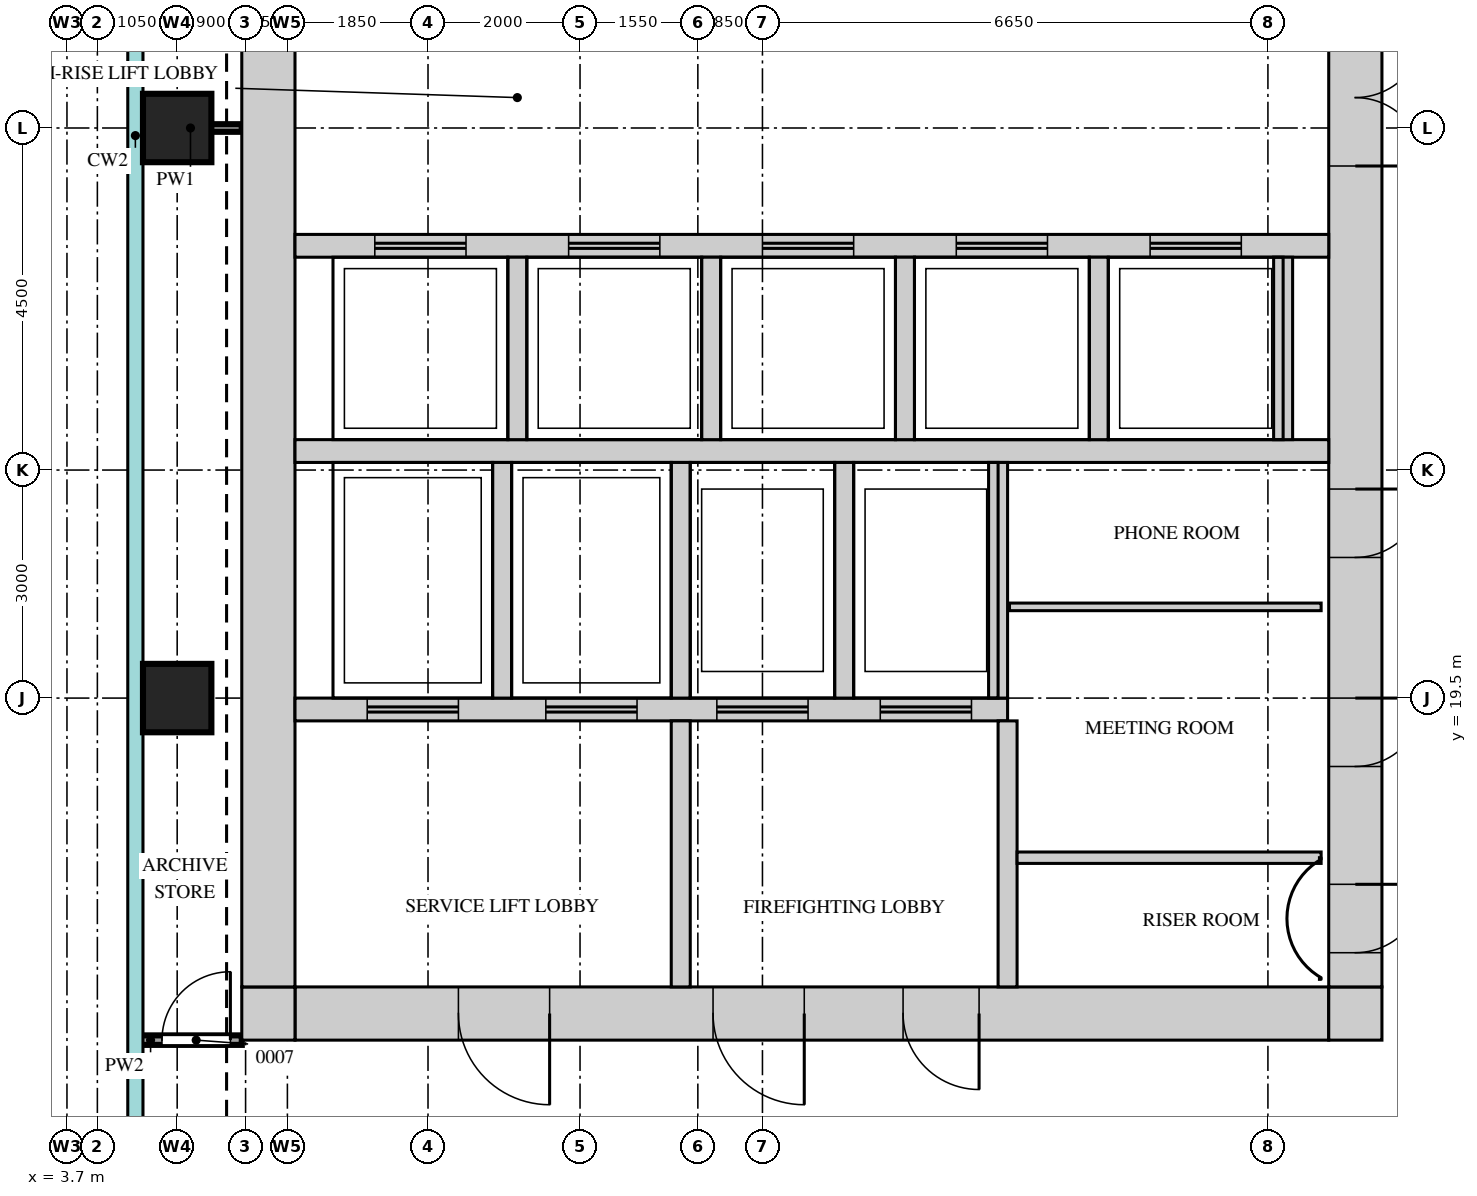
"""IFC4 building model, lengths in metres.
Left out: names, types, materials, properties, quantities, classifications, styles, units other than length and angle.
Written with IfcOpenShell. Run it as: python <this file> out.ifc"""

import sys

from ifc_helpers import new_model, si_unit, direction, frame, frame_2d, origin, origin_2d, place, context, subcontext, project, spatial, rectangle, extrude, source, transform, mapped, element, fill, save


model = new_model("IFC4")
c1 = context("Model", 3, precision=1e-05, world=origin(), true_north=direction((0.0, 1.0)))
c2 = subcontext(c1, "Body", "Model", "MODEL_VIEW")
j1 = project(units=[si_unit("LENGTHUNIT", "METRE"), si_unit("PLANEANGLEUNIT", "RADIAN")], contexts=[c1])
p1 = place(None, origin())
s1 = spatial("IfcSite", under=j1, at=p1, CompositionType="ELEMENT")
p2 = place(p1, origin())
s2 = spatial("IfcBuilding", under=s1, at=p2, CompositionType="ELEMENT")
p3 = place(p2, frame((0.0, 0.0, 230.2)))
s3 = spatial("IfcBuildingStorey", under=s2, at=p3, CompositionType="ELEMENT", Elevation=230.2)
m1 = source(origin(), c2, "Body", "SweptSolid", [
    extrude(rectangle(XDim=13.6, YDim=0.7, at=frame_2d((6.8, 0.0))), origin(), (0.0, 0.0, 1.0), 3.75),
])
p4 = place(p3, frame((6.7, 15.35, 0.0), z_axis=(0.0, 0.0, 1.0), x_axis=(1.0, 0.0, 0.0)))
e1 = element("IfcWall", 1, at=p4, inside=s3, PredefinedType="SHEAR", context=c2, shape_type="MappedRepresentation", body=[
    mapped(m1, transform((0.0, 0.0, 0.0))),
])
m2 = source(origin(), c2, "Body", "SweptSolid", [
    extrude(rectangle(XDim=1.2, YDim=2.1, at=frame_2d((0.6, 1.05))), frame((0.0, 0.36, 0.0), z_axis=(0.0, -1.0, 0.0), x_axis=(1.0, 0.0, 0.0)), (0.0, 0.0, 1.0), 0.72),
])
p5 = place(p4, frame((5.5, 0.0, 0.0)))
e2 = element("IfcOpeningElement", 2, at=p5, cuts=e1, PredefinedType="OPENING", context=c2, shape_type="MappedRepresentation", body=[
    mapped(m2, transform((0.0, 0.0, 0.0))),
])
p6 = place(p4, frame((2.15, 0.0, 0.0)))
e3 = element("IfcOpeningElement", 3, at=p6, cuts=e1, PredefinedType="OPENING", context=c2, shape_type="MappedRepresentation", body=[
    mapped(m2, transform((0.0, 0.0, 0.0))),
])
m3 = source(origin(), c2, "Body", "SweptSolid", [
    extrude(rectangle(XDim=1.0, YDim=2.1, at=frame_2d((0.5, 1.05))), frame((0.0, 0.36, 0.0), z_axis=(0.0, -1.0, 0.0), x_axis=(1.0, 0.0, 0.0)), (0.0, 0.0, 1.0), 0.72),
])
p7 = place(p4, frame((8.0, 0.0, 0.0)))
e4 = element("IfcOpeningElement", 4, at=p7, cuts=e1, PredefinedType="OPENING", context=c2, shape_type="MappedRepresentation", body=[
    mapped(m3, transform((0.0, 0.0, 0.0))),
])
m4 = source(origin(), c2, "Body", "SweptSolid", [
    extrude(rectangle(XDim=0.7, YDim=0.7, at=frame_2d((0.35, 0.0))), origin(), (0.0, 0.0, 1.0), 3.75),
])
for number, where, z_axis, x_axis in (
    (5, (20.3, 15.35, 0.0), (0.0, 0.0, 1.0), (1.0, 0.0, 0.0)),
    (6, (6.0, 15.35, 0.0), (0.0, 0.0, 1.0), (1.0, 0.0, 0.0)),
):
    element("IfcWall", number, at=place(p3, frame(where, z_axis=z_axis, x_axis=x_axis)), inside=s3, PredefinedType="SHEAR", context=c2, shape_type="MappedRepresentation", body=[
        mapped(m4, transform((0.0, 0.0, 0.0))),
    ])
m5 = source(origin(), c2, "Body", "SweptSolid", [
    extrude(rectangle(XDim=22.6, YDim=0.7, at=frame_2d((11.3, 0.0))), origin(), (0.0, 0.0, 1.0), 3.75),
])
p8 = place(p3, frame((20.65, 15.7, 0.0), z_axis=(0.0, 0.0, 1.0), x_axis=(0.0, 1.0, 0.0)))
e7 = element("IfcWall", 7, at=p8, inside=s3, PredefinedType="SHEAR", context=c2, shape_type="MappedRepresentation", body=[
    mapped(m5, transform((0.0, 0.0, 0.0))),
])
m6 = source(origin(), c2, "Body", "SweptSolid", [
    extrude(rectangle(XDim=1.8, YDim=2.1, at=frame_2d((0.9, 1.05))), frame((0.0, 0.36, 0.0), z_axis=(0.0, -1.0, 0.0), x_axis=(1.0, 0.0, 0.0)), (0.0, 0.0, 1.0), 0.72),
])
p9 = place(p8, frame((10.8, 0.0, 0.0)))
e8 = element("IfcOpeningElement", 8, at=p9, cuts=e7, PredefinedType="OPENING", context=c2, shape_type="MappedRepresentation", body=[
    mapped(m6, transform((0.0, 0.0, 0.0))),
])
m7 = source(origin(), c2, "Body", "SweptSolid", [
    extrude(rectangle(XDim=0.9, YDim=2.1, at=frame_2d((0.45, 1.05))), frame((0.0, 0.36, 0.0), z_axis=(0.0, -1.0, 0.0), x_axis=(1.0, 0.0, 0.0)), (0.0, 0.0, 1.0), 0.72),
])
p10 = place(p8, frame((0.45, 0.0, 0.0)))
e9 = element("IfcOpeningElement", 9, at=p10, cuts=e7, PredefinedType="OPENING", context=c2, shape_type="MappedRepresentation", body=[
    mapped(m7, transform((0.0, 0.0, 0.0))),
])
p11 = place(p8, frame((2.9, 0.0, 0.0)))
e10 = element("IfcOpeningElement", 10, at=p11, cuts=e7, PredefinedType="OPENING", context=c2, shape_type="MappedRepresentation", body=[
    mapped(m7, transform((0.0, 0.0, 0.0))),
])
p12 = place(p8, frame((5.65, 0.0, 0.0)))
e11 = element("IfcOpeningElement", 11, at=p12, cuts=e7, PredefinedType="OPENING", context=c2, shape_type="MappedRepresentation", body=[
    mapped(m7, transform((0.0, 0.0, 0.0))),
])
p13 = place(p3, frame((6.35, 15.7, 0.0), z_axis=(0.0, 0.0, 1.0), x_axis=(0.0, 1.0, 0.0)))
e12 = element("IfcWall", 12, at=p13, inside=s3, PredefinedType="SHEAR", context=c2, shape_type="MappedRepresentation", body=[
    mapped(m5, transform((0.0, 0.0, 0.0))),
])
m8 = source(origin(), c2, "Body", "SweptSolid", [
    extrude(rectangle(XDim=13.6, YDim=0.3, at=frame_2d((6.8, 0.0))), origin(), (0.0, 0.0, 1.0), 3.75),
])
p14 = place(p3, frame((6.7, 22.75, 0.0), z_axis=(0.0, 0.0, 1.0), x_axis=(1.0, 0.0, 0.0)))
e13 = element("IfcWall", 13, at=p14, inside=s3, PredefinedType="STANDARD", context=c2, shape_type="MappedRepresentation", body=[
    mapped(m8, transform((0.0, 0.0, 0.0))),
])
m9 = source(origin(), c2, "Body", "SweptSolid", [
    extrude(rectangle(XDim=9.375, YDim=0.3, at=frame_2d((4.688, 0.0))), origin(), (0.0, 0.0, 1.0), 3.75),
])
p15 = place(p3, frame((6.7, 19.35, 0.0), z_axis=(0.0, 0.0, 1.0), x_axis=(1.0, 0.0, 0.0)))
e14 = element("IfcWall", 14, at=p15, inside=s3, PredefinedType="STANDARD", context=c2, shape_type="MappedRepresentation", body=[
    mapped(m9, transform((0.0, 0.0, 0.0))),
])
m10 = source(origin(), c2, "Body", "SweptSolid", [
    extrude(rectangle(XDim=1.2, YDim=2.1, at=frame_2d((0.6, 1.05))), frame((0.0, 0.16, 0.0), z_axis=(0.0, -1.0, 0.0), x_axis=(1.0, 0.0, 0.0)), (0.0, 0.0, 1.0), 0.32),
])
p16 = place(p15, frame((0.95, 0.0, 0.0)))
e15 = element("IfcOpeningElement", 15, at=p16, cuts=e14, PredefinedType="OPENING", context=c2, shape_type="MappedRepresentation", body=[
    mapped(m10, transform((0.0, 0.0, 0.0))),
])
p17 = place(p15, frame((3.3, 0.0, 0.0)))
e16 = element("IfcOpeningElement", 16, at=p17, cuts=e14, PredefinedType="OPENING", context=c2, shape_type="MappedRepresentation", body=[
    mapped(m10, transform((0.0, 0.0, 0.0))),
])
p18 = place(p15, frame((5.55, 0.0, 0.0)))
e17 = element("IfcOpeningElement", 17, at=p18, cuts=e14, PredefinedType="OPENING", context=c2, shape_type="MappedRepresentation", body=[
    mapped(m10, transform((0.0, 0.0, 0.0))),
])
p19 = place(p15, frame((7.7, 0.0, 0.0)))
e18 = element("IfcOpeningElement", 18, at=p19, cuts=e14, PredefinedType="OPENING", context=c2, shape_type="MappedRepresentation", body=[
    mapped(m10, transform((0.0, 0.0, 0.0))),
])
p20 = place(p3, frame((6.7, 25.45, 0.0), z_axis=(0.0, 0.0, 1.0), x_axis=(1.0, 0.0, 0.0)))
e19 = element("IfcWall", 19, at=p20, inside=s3, PredefinedType="STANDARD", context=c2, shape_type="MappedRepresentation", body=[
    mapped(m8, transform((0.0, 0.0, 0.0))),
])
p21 = place(p20, frame((1.05, 0.0, 0.0)))
e20 = element("IfcOpeningElement", 20, at=p21, cuts=e19, PredefinedType="OPENING", context=c2, shape_type="MappedRepresentation", body=[
    mapped(m10, transform((0.0, 0.0, 0.0))),
])
p22 = place(p20, frame((3.6, 0.0, 0.0)))
e21 = element("IfcOpeningElement", 21, at=p22, cuts=e19, PredefinedType="OPENING", context=c2, shape_type="MappedRepresentation", body=[
    mapped(m10, transform((0.0, 0.0, 0.0))),
])
p23 = place(p20, frame((6.15, 0.0, 0.0)))
e22 = element("IfcOpeningElement", 22, at=p23, cuts=e19, PredefinedType="OPENING", context=c2, shape_type="MappedRepresentation", body=[
    mapped(m10, transform((0.0, 0.0, 0.0))),
])
p24 = place(p20, frame((8.7, 0.0, 0.0)))
e23 = element("IfcOpeningElement", 23, at=p24, cuts=e19, PredefinedType="OPENING", context=c2, shape_type="MappedRepresentation", body=[
    mapped(m10, transform((0.0, 0.0, 0.0))),
])
p25 = place(p20, frame((11.25, 0.0, 0.0)))
e24 = element("IfcOpeningElement", 24, at=p25, cuts=e19, PredefinedType="OPENING", context=c2, shape_type="MappedRepresentation", body=[
    mapped(m10, transform((0.0, 0.0, 0.0))),
])
m11 = source(origin(), c2, "Body", "SweptSolid", [
    extrude(rectangle(XDim=3.1, YDim=0.25, at=frame_2d((1.55, 0.0))), origin(), (0.0, 0.0, 1.0), 3.75),
])
for number, where, z_axis, x_axis in (
    (25, (9.425, 19.5, 0.0), (0.0, 0.0, 1.0), (0.0, 1.0, 0.0)),
    (26, (11.775, 19.5, 0.0), (0.0, 0.0, 1.0), (0.0, 1.0, 0.0)),
    (27, (13.925, 19.5, 0.0), (0.0, 0.0, 1.0), (0.0, 1.0, 0.0)),
    (28, (15.95, 19.5, 0.0), (0.0, 0.0, 1.0), (0.0, 1.0, 0.0)),
):
    element("IfcWall", number, at=place(p3, frame(where, z_axis=z_axis, x_axis=x_axis)), inside=s3, PredefinedType="STANDARD", context=c2, shape_type="MappedRepresentation", body=[
        mapped(m11, transform((0.0, 0.0, 0.0))),
    ])
m12 = source(origin(), c2, "Body", "SweptSolid", [
    extrude(rectangle(XDim=2.4, YDim=0.25, at=frame_2d((1.2, 0.0))), origin(), (0.0, 0.0, 1.0), 3.75),
])
for number, where, z_axis, x_axis in (
    (29, (17.275, 22.9, 0.0), (0.0, 0.0, 1.0), (0.0, 1.0, 0.0)),
    (30, (19.7, 22.9, 0.0), (0.0, 0.0, 1.0), (0.0, 1.0, 0.0)),
    (31, (9.625, 22.9, 0.0), (0.0, 0.0, 1.0), (0.0, 1.0, 0.0)),
    (32, (12.175, 22.9, 0.0), (0.0, 0.0, 1.0), (0.0, 1.0, 0.0)),
    (33, (14.725, 22.9, 0.0), (0.0, 0.0, 1.0), (0.0, 1.0, 0.0)),
):
    element("IfcWall", number, at=place(p3, frame(where, z_axis=z_axis, x_axis=x_axis)), inside=s3, PredefinedType="STANDARD", context=c2, shape_type="MappedRepresentation", body=[
        mapped(m12, transform((0.0, 0.0, 0.0))),
    ])
m13 = source(origin(), c2, "Body", "SweptSolid", [
    extrude(rectangle(XDim=3.5, YDim=0.25, at=frame_2d((1.75, 0.0))), origin(), (0.0, 0.0, 1.0), 3.75),
])
for number, where, z_axis, x_axis in (
    (34, (16.075, 15.7, 0.0), (0.0, 0.0, 1.0), (0.0, 1.0, 0.0)),
    (35, (11.775, 15.7, 0.0), (0.0, 0.0, 1.0), (0.0, 1.0, 0.0)),
):
    element("IfcWall", number, at=place(p3, frame(where, z_axis=z_axis, x_axis=x_axis)), inside=s3, PredefinedType="STANDARD", context=c2, shape_type="MappedRepresentation", body=[
        mapped(m13, transform((0.0, 0.0, 0.0))),
    ])
m14 = source(origin(), c2, "Body", "SweptSolid", [
    extrude(rectangle(XDim=0.9, YDim=0.9, at=origin_2d()), origin(), (0.0, 0.0, 1.0), 3.75),
])
for number, where, z_axis, x_axis in (
    (36, (5.15, 19.5, 0.0), (0.0, 0.0, 1.0), (1.0, 0.0, 0.0)),
    (37, (5.15, 27.0, 0.0), (0.0, 0.0, 1.0), (1.0, 0.0, 0.0)),
):
    element("IfcColumn", number, at=place(p3, frame(where, z_axis=z_axis, x_axis=x_axis)), inside=s3, PredefinedType="COLUMN", context=c2, shape_type="MappedRepresentation", body=[
        mapped(m14, transform((0.0, 0.0, 0.0))),
    ])
m15 = source(origin(), c2, "Body", "SweptSolid", [
    extrude(rectangle(XDim=1.35, YDim=0.125, at=frame_2d((0.675, 0.0))), origin(), (0.0, 0.0, 1.0), 3.8),
])
p26 = place(p3, frame((4.65, 15.0, 0.0), z_axis=(0.0, 0.0, 1.0), x_axis=(1.0, 0.0, 0.0)))
e38 = element("IfcWall", 38, at=p26, inside=s3, PredefinedType="PARTITIONING", context=c2, shape_type="MappedRepresentation", body=[
    mapped(m15, transform((0.0, 0.0, 0.0))),
])
m16 = source(origin(), c2, "Body", "SweptSolid", [
    extrude(rectangle(XDim=0.9, YDim=2.1, at=frame_2d((0.45, 1.05))), frame((0.0, 0.073, 0.0), z_axis=(0.0, -1.0, 0.0), x_axis=(1.0, 0.0, 0.0)), (0.0, 0.0, 1.0), 0.145),
])
p27 = place(p26, frame((0.3, 0.0, 0.0)))
e39 = element("IfcOpeningElement", 39, at=p27, cuts=e38, PredefinedType="OPENING", context=c2, shape_type="MappedRepresentation", body=[
    mapped(m16, transform((0.0, 0.0, 0.0))),
])
m17 = source(origin(), c2, "Body", "SweptSolid", [
    extrude(rectangle(XDim=4.0, YDim=0.15, at=frame_2d((2.0, 0.0))), origin(), (0.0, 0.0, 1.0), 3.8),
])
p28 = place(p3, frame((16.2, 17.4, 0.0), z_axis=(0.0, 0.0, 1.0), x_axis=(1.0, 0.0, 0.0)))
e40 = element("IfcWall", 40, at=p28, inside=s3, PredefinedType="PARTITIONING", context=c2, shape_type="MappedRepresentation", body=[
    mapped(m17, transform((0.0, 0.0, 0.0))),
])
m18 = source(origin(), c2, "Body", "SweptSolid", [
    extrude(rectangle(XDim=4.1, YDim=0.1, at=frame_2d((2.05, 0.0))), origin(), (0.0, 0.0, 1.0), 3.8),
])
p29 = place(p3, frame((16.1, 20.7, 0.0), z_axis=(0.0, 0.0, 1.0), x_axis=(1.0, 0.0, 0.0)))
e41 = element("IfcWall", 41, at=p29, inside=s3, PredefinedType="PARTITIONING", context=c2, shape_type="MappedRepresentation", body=[
    mapped(m18, transform((0.0, 0.0, 0.0))),
])
m19 = source(origin(), c2, "Body", "SweptSolid", [
    extrude(rectangle(XDim=1.35, YDim=0.1, at=frame_2d((0.675, 0.0))), origin(), (0.0, 0.0, 1.0), 3.8),
])
p30 = place(p3, frame((4.65, 27.0, 0.0), z_axis=(0.0, 0.0, 1.0), x_axis=(1.0, 0.0, 0.0)))
e42 = element("IfcWall", 42, at=p30, inside=s3, PredefinedType="PARTITIONING", context=c2, shape_type="MappedRepresentation", body=[
    mapped(m19, transform((0.0, 0.0, 0.0))),
])
m20 = source(origin(), c2, "Body", "SweptSolid", [
    extrude(rectangle(XDim=1.8, YDim=2.1, at=frame_2d((0.9, 1.05))), frame((0.0, 0.3, 0.0), z_axis=(0.0, -1.0, 0.0), x_axis=(1.0, 0.0, 0.0)), (0.0, 0.0, 1.0), 0.6),
])
p31 = place(p9, origin())
e43 = element("IfcDoor", 43, at=p31, inside=s3, OperationType="DOUBLE_DOOR_SINGLE_SWING", PredefinedType="DOOR", context=c2, shape_type="MappedRepresentation", body=[
    mapped(m20, transform((0.0, 0.0, 0.0))),
])
fill(e8, e43)
m21 = source(origin(), c2, "Body", "SweptSolid", [
    extrude(rectangle(XDim=0.9, YDim=2.1, at=frame_2d((0.45, 1.05))), frame((0.0, 0.3, 0.0), z_axis=(0.0, -1.0, 0.0), x_axis=(1.0, 0.0, 0.0)), (0.0, 0.0, 1.0), 0.6),
])
p32 = place(p10, origin())
e44 = element("IfcDoor", 44, at=p32, inside=s3, OperationType="SINGLE_SWING_RIGHT", PredefinedType="DOOR", context=c2, shape_type="MappedRepresentation", body=[
    mapped(m21, transform((0.0, 0.0, 0.0))),
])
fill(e9, e44)
p33 = place(p11, origin())
e45 = element("IfcDoor", 45, at=p33, inside=s3, OperationType="SINGLE_SWING_RIGHT", PredefinedType="DOOR", context=c2, shape_type="MappedRepresentation", body=[
    mapped(m21, transform((0.0, 0.0, 0.0))),
])
fill(e10, e45)
p34 = place(p12, origin())
e46 = element("IfcDoor", 46, at=p34, inside=s3, OperationType="SINGLE_SWING_RIGHT", PredefinedType="DOOR", context=c2, shape_type="MappedRepresentation", body=[
    mapped(m21, transform((0.0, 0.0, 0.0))),
])
fill(e11, e46)
m22 = source(origin(), c2, "Body", "SweptSolid", [
    extrude(rectangle(XDim=1.2, YDim=2.1, at=frame_2d((0.6, 1.05))), frame((0.0, 0.3, 0.0), z_axis=(0.0, -1.0, 0.0), x_axis=(1.0, 0.0, 0.0)), (0.0, 0.0, 1.0), 0.6),
])
p35 = place(p5, origin())
e47 = element("IfcDoor", 47, at=p35, inside=s3, OperationType="SINGLE_SWING_RIGHT", PredefinedType="DOOR", context=c2, shape_type="MappedRepresentation", body=[
    mapped(m22, transform((0.0, 0.0, 0.0))),
])
fill(e2, e47)
p36 = place(p6, origin())
e48 = element("IfcDoor", 48, at=p36, inside=s3, OperationType="SINGLE_SWING_RIGHT", PredefinedType="DOOR", context=c2, shape_type="MappedRepresentation", body=[
    mapped(m22, transform((0.0, 0.0, 0.0))),
])
fill(e3, e48)
m23 = source(origin(), c2, "Body", "SweptSolid", [
    extrude(rectangle(XDim=1.0, YDim=2.1, at=frame_2d((0.5, 1.05))), frame((0.0, 0.3, 0.0), z_axis=(0.0, -1.0, 0.0), x_axis=(1.0, 0.0, 0.0)), (0.0, 0.0, 1.0), 0.6),
])
p37 = place(p7, origin())
e49 = element("IfcDoor", 49, at=p37, inside=s3, OperationType="SINGLE_SWING_RIGHT", PredefinedType="DOOR", context=c2, shape_type="MappedRepresentation", body=[
    mapped(m23, transform((0.0, 0.0, 0.0))),
])
fill(e4, e49)
m24 = source(origin(), c2, "Body", "SweptSolid", [
    extrude(rectangle(XDim=0.9, YDim=2.1, at=frame_2d((0.45, 1.05))), frame((0.0, 0.025, 0.0), z_axis=(0.0, -1.0, 0.0), x_axis=(1.0, 0.0, 0.0)), (0.0, 0.0, 1.0), 0.05),
])
p38 = place(p27, origin())
e50 = element("IfcDoor", 50, at=p38, inside=s3, OperationType="SINGLE_SWING_LEFT", PredefinedType="DOOR", context=c2, shape_type="MappedRepresentation", body=[
    mapped(m24, transform((0.0, 0.0, 0.0))),
])
fill(e39, e50)
m25 = source(origin(), c2, "Body", "SweptSolid", [
    extrude(rectangle(XDim=1.2, YDim=2.1, at=frame_2d((0.6, 1.05))), frame((0.0, 0.025, 0.0), z_axis=(0.0, -1.0, 0.0), x_axis=(1.0, 0.0, 0.0)), (0.0, 0.0, 1.0), 0.05),
])
p39 = place(p21, origin())
e51 = element("IfcDoor", 51, at=p39, inside=s3, OperationType="DOUBLE_DOOR_SLIDING", PredefinedType="DOOR", context=c2, shape_type="MappedRepresentation", body=[
    mapped(m25, transform((0.0, 0.0, 0.0))),
])
fill(e20, e51)
p40 = place(p22, origin())
e52 = element("IfcDoor", 52, at=p40, inside=s3, OperationType="DOUBLE_DOOR_SLIDING", PredefinedType="DOOR", context=c2, shape_type="MappedRepresentation", body=[
    mapped(m25, transform((0.0, 0.0, 0.0))),
])
fill(e21, e52)
p41 = place(p23, origin())
e53 = element("IfcDoor", 53, at=p41, inside=s3, OperationType="DOUBLE_DOOR_SLIDING", PredefinedType="DOOR", context=c2, shape_type="MappedRepresentation", body=[
    mapped(m25, transform((0.0, 0.0, 0.0))),
])
fill(e22, e53)
p42 = place(p24, origin())
e54 = element("IfcDoor", 54, at=p42, inside=s3, OperationType="DOUBLE_DOOR_SLIDING", PredefinedType="DOOR", context=c2, shape_type="MappedRepresentation", body=[
    mapped(m25, transform((0.0, 0.0, 0.0))),
])
fill(e23, e54)
p43 = place(p25, origin())
e55 = element("IfcDoor", 55, at=p43, inside=s3, OperationType="DOUBLE_DOOR_SLIDING", PredefinedType="DOOR", context=c2, shape_type="MappedRepresentation", body=[
    mapped(m25, transform((0.0, 0.0, 0.0))),
])
fill(e24, e55)
p44 = place(p16, origin())
e56 = element("IfcDoor", 56, at=p44, inside=s3, OperationType="DOUBLE_DOOR_SLIDING", PredefinedType="DOOR", context=c2, shape_type="MappedRepresentation", body=[
    mapped(m25, transform((0.0, 0.0, 0.0))),
])
fill(e15, e56)
p45 = place(p17, origin())
e57 = element("IfcDoor", 57, at=p45, inside=s3, OperationType="DOUBLE_DOOR_SLIDING", PredefinedType="DOOR", context=c2, shape_type="MappedRepresentation", body=[
    mapped(m25, transform((0.0, 0.0, 0.0))),
])
fill(e16, e57)
p46 = place(p18, origin())
e58 = element("IfcDoor", 58, at=p46, inside=s3, OperationType="DOUBLE_DOOR_SLIDING", PredefinedType="DOOR", context=c2, shape_type="MappedRepresentation", body=[
    mapped(m25, transform((0.0, 0.0, 0.0))),
])
fill(e17, e58)
p47 = place(p19, origin())
e59 = element("IfcDoor", 59, at=p47, inside=s3, OperationType="DOUBLE_DOOR_SLIDING", PredefinedType="DOOR", context=c2, shape_type="MappedRepresentation", body=[
    mapped(m25, transform((0.0, 0.0, 0.0))),
])
fill(e18, e59)
save(model, sys.argv[1])
